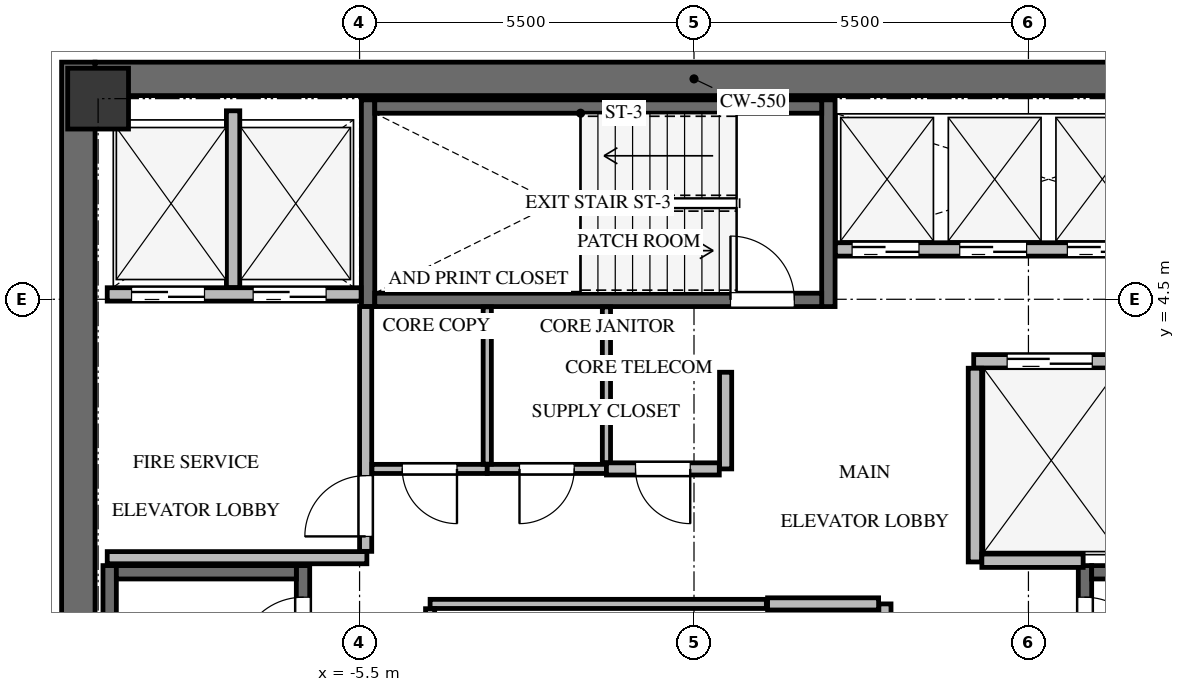
"""IFC4 building model, lengths in metres.
Left out: names, types, materials, properties, quantities, classifications, styles, units other than length and angle.
Written with IfcOpenShell. Run it as: python <this file> out.ifc"""

import sys

from ifc_helpers import new_model, si_unit, direction, frame, frame_2d, origin, origin_2d, place, context, subcontext, project, spatial, rectangle, extrude, source, transform, mapped, element, fill, save


model = new_model("IFC4")
c1 = context("Model", 3, precision=1e-05, world=origin(), true_north=direction((0.0, 1.0)))
c2 = subcontext(c1, "Body", "Model", "MODEL_VIEW")
j1 = project(units=[si_unit("LENGTHUNIT", "METRE"), si_unit("PLANEANGLEUNIT", "RADIAN")], contexts=[c1])
p1 = place(None, origin())
s1 = spatial("IfcSite", under=j1, at=p1, CompositionType="ELEMENT")
p2 = place(p1, origin())
s2 = spatial("IfcBuilding", under=s1, at=p2, CompositionType="ELEMENT")
p3 = place(p2, frame((0.0, 0.0, 258.1)))
s3 = spatial("IfcBuildingStorey", under=s2, at=p3, CompositionType="ELEMENT", Elevation=258.1)
p4 = place(p3, frame((-10.125, -8.4, 0.0), z_axis=(0.0, 0.0, 1.0), x_axis=(0.0, 1.0, 0.0)))
e1 = element("IfcWall", 1, at=p4, inside=s3, PredefinedType="SHEAR", context=c2, shape_type="SweptSolid", body=[
    extrude(rectangle(XDim=16.8, YDim=0.55, at=frame_2d((8.4, 0.0))), origin(), (0.0, 0.0, 1.0), 3.4),
])
p5 = place(p3, frame((-9.85, 8.125, 0.0), z_axis=(0.0, 0.0, 1.0), x_axis=(1.0, 0.0, 0.0)))
e2 = element("IfcWall", 2, at=p5, inside=s3, PredefinedType="SHEAR", context=c2, shape_type="SweptSolid", body=[
    extrude(rectangle(XDim=19.7, YDim=0.55, at=frame_2d((9.85, 0.0))), origin(), (0.0, 0.0, 1.0), 3.4),
])
p6 = place(p3, frame((-6.43, -7.77, -0.24), z_axis=(0.0, 0.0, 1.0), x_axis=(0.0, 1.0, 0.0)))
e3 = element("IfcWall", 3, at=p6, inside=s3, PredefinedType="SHEAR", context=c2, shape_type="SweptSolid", body=[
    extrude(rectangle(XDim=7.89, YDim=0.22, at=frame_2d((3.945, 0.0))), origin(), (0.0, 0.0, 1.0), 3.4),
])
p7 = place(p6, frame((6.32, 0.0, 0.0)))
e4 = element("IfcOpeningElement", 4, at=p7, cuts=e3, PredefinedType="OPENING", context=c2, shape_type="SweptSolid", body=[
    extrude(rectangle(XDim=1.05, YDim=2.15, at=frame_2d((0.525, 1.075))), frame((0.0, 0.12, 0.0), z_axis=(0.0, -1.0, 0.0), x_axis=(1.0, 0.0, 0.0)), (0.0, 0.0, 1.0), 0.24),
])
p8 = place(p3, frame((-9.61, 0.12, -0.24), z_axis=(0.0, 0.0, 1.0), x_axis=(0.0, -1.0, 0.0)))
e5 = element("IfcWall", 5, at=p8, inside=s3, PredefinedType="SHEAR", context=c2, shape_type="SweptSolid", body=[
    extrude(rectangle(XDim=7.89, YDim=0.22, at=frame_2d((3.945, 0.0))), origin(), (0.0, 0.0, 1.0), 3.4),
])
p9 = place(p3, frame((-6.54, 0.01, -0.24), z_axis=(0.0, 0.0, 1.0), x_axis=(-1.0, 0.0, 0.0)))
e6 = element("IfcWall", 6, at=p9, inside=s3, PredefinedType="SHEAR", context=c2, shape_type="SweptSolid", body=[
    extrude(rectangle(XDim=2.96, YDim=0.22, at=frame_2d((1.48, 0.0))), origin(), (0.0, 0.0, 1.0), 3.4),
])
p10 = place(p3, frame((6.43, 0.12, -0.24), z_axis=(0.0, 0.0, 1.0), x_axis=(0.0, -1.0, 0.0)))
e7 = element("IfcWall", 7, at=p10, inside=s3, PredefinedType="SHEAR", context=c2, shape_type="SweptSolid", body=[
    extrude(rectangle(XDim=7.89, YDim=0.22, at=frame_2d((3.945, 0.0))), origin(), (0.0, 0.0, 1.0), 3.4),
])
p11 = place(p10, frame((0.52, 0.0, 0.0)))
e8 = element("IfcOpeningElement", 8, at=p11, cuts=e7, PredefinedType="OPENING", context=c2, shape_type="SweptSolid", body=[
    extrude(rectangle(XDim=1.05, YDim=2.15, at=frame_2d((0.525, 1.075))), frame((0.0, 0.12, 0.0), z_axis=(0.0, -1.0, 0.0), x_axis=(1.0, 0.0, 0.0)), (0.0, 0.0, 1.0), 0.24),
])
p12 = place(p3, frame((9.5, 0.01, -0.24), z_axis=(0.0, 0.0, 1.0), x_axis=(-1.0, 0.0, 0.0)))
e9 = element("IfcWall", 9, at=p12, inside=s3, PredefinedType="SHEAR", context=c2, shape_type="SweptSolid", body=[
    extrude(rectangle(XDim=2.96, YDim=0.22, at=frame_2d((1.48, 0.0))), origin(), (0.0, 0.0, 1.0), 3.4),
])
for number, where, z_axis, x_axis in (
    (10, (2.21, 4.38, -0.24), (0.0, 0.0, 1.0), (0.0, 1.0, 0.0)),
    (11, (-5.36, 7.78, -0.24), (0.0, 0.0, 1.0), (0.0, -1.0, 0.0)),
):
    element("IfcWall", number, at=place(p3, frame(where, z_axis=z_axis, x_axis=x_axis)), inside=s3, PredefinedType="SHEAR", context=c2, shape_type="SweptSolid", body=[
        extrude(rectangle(XDim=3.4, YDim=0.22, at=frame_2d((1.7, 0.0))), origin(), (0.0, 0.0, 1.0), 3.4),
    ])
p13 = place(p3, frame((-5.25, 4.49, -0.24), z_axis=(0.0, 0.0, 1.0), x_axis=(1.0, 0.0, 0.0)))
e12 = element("IfcWall", 12, at=p13, inside=s3, PredefinedType="SHEAR", context=c2, shape_type="SweptSolid", body=[
    extrude(rectangle(XDim=7.35, YDim=0.22, at=frame_2d((3.675, 0.0))), origin(), (0.0, 0.0, 1.0), 3.4),
])
p14 = place(p13, frame((5.85, 0.0, 0.0)))
e13 = element("IfcOpeningElement", 13, at=p14, cuts=e12, PredefinedType="OPENING", context=c2, shape_type="SweptSolid", body=[
    extrude(rectangle(XDim=1.05, YDim=2.15, at=frame_2d((0.525, 1.075))), frame((0.0, 0.12, 0.0), z_axis=(0.0, -1.0, 0.0), x_axis=(1.0, 0.0, 0.0)), (0.0, 0.0, 1.0), 0.24),
])
p15 = place(p3, frame((2.1, 7.67, -0.24), z_axis=(0.0, 0.0, 1.0), x_axis=(-1.0, 0.0, 0.0)))
e14 = element("IfcWall", 14, at=p15, inside=s3, PredefinedType="SHEAR", context=c2, shape_type="SweptSolid", body=[
    extrude(rectangle(XDim=7.35, YDim=0.22, at=frame_2d((3.675, 0.0))), origin(), (0.0, 0.0, 1.0), 3.4),
])
m1 = source(origin(), c2, "Body", "SweptSolid", [
    extrude(rectangle(XDim=1.0, YDim=1.0, at=origin_2d()), origin(), (0.0, 0.0, 1.0), 3.4),
])
p16 = place(p3, frame((-9.8, 7.8, -0.24), z_axis=(0.0, 0.0, 1.0), x_axis=(1.0, 0.0, 0.0)))
e15 = element("IfcColumn", 15, at=p16, inside=s3, PredefinedType="COLUMN", context=c2, shape_type="MappedRepresentation", body=[
    mapped(m1, transform((0.0, 0.0, 0.0), x_axis=(1.0, 0.0, 0.0), y_axis=(0.0, 1.0, 0.0), z_axis=(0.0, 0.0, 1.0), scale=1.0)),
])
p17 = place(p3, frame((-9.65, 4.58, 0.0), z_axis=(0.0, 0.0, 1.0), x_axis=(1.0, 0.0, 0.0)))
e16 = element("IfcWall", 16, at=p17, inside=s3, PredefinedType="SOLIDWALL", context=c2, shape_type="SweptSolid", body=[
    extrude(rectangle(XDim=4.175, YDim=0.22, at=frame_2d((2.087, 0.0))), origin(), (0.0, 0.0, 1.0), 3.145),
])
p18 = place(p17, frame((0.4, 0.0, 0.0)))
e17 = element("IfcOpeningElement", 17, at=p18, cuts=e16, PredefinedType="OPENING", context=c2, shape_type="SweptSolid", body=[
    extrude(rectangle(XDim=1.2, YDim=2.15, at=frame_2d((0.6, 1.075))), frame((0.0, 0.12, 0.0), z_axis=(0.0, -1.0, 0.0), x_axis=(1.0, 0.0, 0.0)), (0.0, 0.0, 1.0), 0.24),
])
p19 = place(p17, frame((2.4, 0.0, 0.0)))
e18 = element("IfcOpeningElement", 18, at=p19, cuts=e16, PredefinedType="OPENING", context=c2, shape_type="SweptSolid", body=[
    extrude(rectangle(XDim=1.2, YDim=2.15, at=frame_2d((0.6, 1.075))), frame((0.0, 0.12, 0.0), z_axis=(0.0, -1.0, 0.0), x_axis=(1.0, 0.0, 0.0)), (0.0, 0.0, 1.0), 0.24),
])
p20 = place(p3, frame((-7.58, 4.694, 0.0), z_axis=(0.0, 0.0, 1.0), x_axis=(0.0, 1.0, 0.0)))
e19 = element("IfcWall", 19, at=p20, inside=s3, PredefinedType="SOLIDWALL", context=c2, shape_type="SweptSolid", body=[
    extrude(rectangle(XDim=2.906, YDim=0.22, at=frame_2d((1.453, 0.0))), origin(), (0.0, 0.0, 1.0), 3.145),
])
p21 = place(p3, frame((-9.65, 0.25, 0.0), z_axis=(0.0, 0.0, 1.0), x_axis=(1.0, 0.0, 0.0)))
e20 = element("IfcWall", 20, at=p21, inside=s3, PredefinedType="SOLIDWALL", context=c2, shape_type="SweptSolid", body=[
    extrude(rectangle(XDim=4.27, YDim=0.2, at=frame_2d((2.135, 0.0))), origin(), (0.0, 0.0, 1.0), 3.145),
])
p22 = place(p3, frame((-5.4, 0.354, 0.0), z_axis=(0.0, 0.0, 1.0), x_axis=(0.0, 1.0, 0.0)))
e21 = element("IfcWall", 21, at=p22, inside=s3, PredefinedType="SOLIDWALL", context=c2, shape_type="SweptSolid", body=[
    extrude(rectangle(XDim=4.026, YDim=0.2, at=frame_2d((2.013, 0.0))), origin(), (0.0, 0.0, 1.0), 3.145),
])
p23 = place(p22, frame((0.246, 0.0, 0.0)))
e22 = element("IfcOpeningElement", 22, at=p23, cuts=e21, PredefinedType="OPENING", context=c2, shape_type="SweptSolid", body=[
    extrude(rectangle(XDim=1.0, YDim=2.15, at=frame_2d((0.5, 1.075))), frame((0.0, 0.11, 0.0), z_axis=(0.0, -1.0, 0.0), x_axis=(1.0, 0.0, 0.0)), (0.0, 0.0, 1.0), 0.22),
])
p24 = place(p3, frame((4.6, 3.48, 0.0), z_axis=(0.0, 0.0, 1.0), x_axis=(1.0, 0.0, 0.0)))
e23 = element("IfcWall", 23, at=p24, inside=s3, PredefinedType="SOLIDWALL", context=c2, shape_type="SweptSolid", body=[
    extrude(rectangle(XDim=5.05, YDim=0.22, at=frame_2d((2.525, 0.0))), origin(), (0.0, 0.0, 1.0), 3.145),
])
p25 = place(p24, frame((0.55, 0.0, 0.0)))
e24 = element("IfcOpeningElement", 24, at=p25, cuts=e23, PredefinedType="OPENING", context=c2, shape_type="SweptSolid", body=[
    extrude(rectangle(XDim=1.4, YDim=2.15, at=frame_2d((0.7, 1.075))), frame((0.0, 0.12, 0.0), z_axis=(0.0, -1.0, 0.0), x_axis=(1.0, 0.0, 0.0)), (0.0, 0.0, 1.0), 0.24),
])
p26 = place(p24, frame((3.05, 0.0, 0.0)))
e25 = element("IfcOpeningElement", 25, at=p26, cuts=e23, PredefinedType="OPENING", context=c2, shape_type="SweptSolid", body=[
    extrude(rectangle(XDim=1.4, YDim=2.15, at=frame_2d((0.7, 1.075))), frame((0.0, 0.12, 0.0), z_axis=(0.0, -1.0, 0.0), x_axis=(1.0, 0.0, 0.0)), (0.0, 0.0, 1.0), 0.24),
])
p27 = place(p3, frame((4.62, 0.18, 0.0), z_axis=(0.0, 0.0, 1.0), x_axis=(0.0, 1.0, 0.0)))
e26 = element("IfcWall", 26, at=p27, inside=s3, PredefinedType="SOLIDWALL", context=c2, shape_type="SweptSolid", body=[
    extrude(rectangle(XDim=3.186, YDim=0.22, at=frame_2d((1.593, 0.0))), origin(), (0.0, 0.0, 1.0), 3.145),
])
p28 = place(p3, frame((4.734, 0.2, 0.0), z_axis=(0.0, 0.0, 1.0), x_axis=(1.0, 0.0, 0.0)))
e27 = element("IfcWall", 27, at=p28, inside=s3, PredefinedType="SOLIDWALL", context=c2, shape_type="SweptSolid", body=[
    extrude(rectangle(XDim=1.666, YDim=0.22, at=frame_2d((0.833, 0.0))), origin(), (0.0, 0.0, 1.0), 3.145),
])
p29 = place(p3, frame((2.325, 5.32, 0.0), z_axis=(0.0, 0.0, 1.0), x_axis=(1.0, 0.0, 0.0)))
e28 = element("IfcWall", 28, at=p29, inside=s3, PredefinedType="SOLIDWALL", context=c2, shape_type="SweptSolid", body=[
    extrude(rectangle(XDim=7.325, YDim=0.22, at=frame_2d((3.663, 0.0))), origin(), (0.0, 0.0, 1.0), 3.145),
])
p30 = place(p29, frame((0.275, 0.0, 0.0)))
e29 = element("IfcOpeningElement", 29, at=p30, cuts=e28, PredefinedType="OPENING", context=c2, shape_type="SweptSolid", body=[
    extrude(rectangle(XDim=1.1, YDim=2.15, at=frame_2d((0.55, 1.075))), frame((0.0, 0.12, 0.0), z_axis=(0.0, -1.0, 0.0), x_axis=(1.0, 0.0, 0.0)), (0.0, 0.0, 1.0), 0.24),
])
p31 = place(p29, frame((2.045, 0.0, 0.0)))
e30 = element("IfcOpeningElement", 30, at=p31, cuts=e28, PredefinedType="OPENING", context=c2, shape_type="SweptSolid", body=[
    extrude(rectangle(XDim=1.1, YDim=2.15, at=frame_2d((0.55, 1.075))), frame((0.0, 0.12, 0.0), z_axis=(0.0, -1.0, 0.0), x_axis=(1.0, 0.0, 0.0)), (0.0, 0.0, 1.0), 0.24),
])
p32 = place(p29, frame((3.815, 0.0, 0.0)))
e31 = element("IfcOpeningElement", 31, at=p32, cuts=e28, PredefinedType="OPENING", context=c2, shape_type="SweptSolid", body=[
    extrude(rectangle(XDim=1.1, YDim=2.15, at=frame_2d((0.55, 1.075))), frame((0.0, 0.12, 0.0), z_axis=(0.0, -1.0, 0.0), x_axis=(1.0, 0.0, 0.0)), (0.0, 0.0, 1.0), 0.24),
])
p33 = place(p29, frame((5.585, 0.0, 0.0)))
e32 = element("IfcOpeningElement", 32, at=p33, cuts=e28, PredefinedType="OPENING", context=c2, shape_type="SweptSolid", body=[
    extrude(rectangle(XDim=1.1, YDim=2.15, at=frame_2d((0.55, 1.075))), frame((0.0, 0.12, 0.0), z_axis=(0.0, -1.0, 0.0), x_axis=(1.0, 0.0, 0.0)), (0.0, 0.0, 1.0), 0.24),
])
p34 = place(p3, frame((-4.34, -0.51, 0.0), z_axis=(0.0, 0.0, 1.0), x_axis=(1.0, 0.0, 0.0)))
e33 = element("IfcWall", 33, at=p34, inside=s3, PredefinedType="PARTITIONING", context=c2, shape_type="SweptSolid", body=[
    extrude(rectangle(XDim=5.53, YDim=0.15, at=frame_2d((2.765, 0.0))), origin(), (0.0, 0.0, 1.0), 3.145),
])
p35 = place(p3, frame((-4.34, -2.961, 0.0), z_axis=(0.0, 0.0, 1.0), x_axis=(0.0, 1.0, 0.0)))
e34 = element("IfcWall", 34, at=p35, inside=s3, PredefinedType="PARTITIONING", context=c2, shape_type="SweptSolid", body=[
    extrude(rectangle(XDim=2.372, YDim=0.15, at=frame_2d((1.186, 0.0))), origin(), (0.0, 0.0, 1.0), 3.145),
])
p36 = place(p3, frame((3.14, -0.51, 0.0), z_axis=(0.0, 0.0, 1.0), x_axis=(0.0, -1.0, 0.0)))
e35 = element("IfcWall", 35, at=p36, inside=s3, PredefinedType="SOLIDWALL", context=c2, shape_type="SweptSolid", body=[
    extrude(rectangle(XDim=2.53, YDim=0.2, at=frame_2d((1.265, 0.0))), origin(), (0.0, 0.0, 1.0), 3.145),
])
p37 = place(p36, frame((0.815, 0.0, 0.0)))
e36 = element("IfcOpeningElement", 36, at=p37, cuts=e35, PredefinedType="OPENING", context=c2, shape_type="SweptSolid", body=[
    extrude(rectangle(XDim=0.9, YDim=2.05, at=frame_2d((0.45, 1.025))), frame((0.0, 0.11, 0.0), z_axis=(0.0, -1.0, 0.0), x_axis=(1.0, 0.0, 0.0)), (0.0, 0.0, 1.0), 0.22),
])
p38 = place(p3, frame((1.21, -0.51, 0.0), z_axis=(0.0, 0.0, 1.0), x_axis=(1.0, 0.0, 0.0)))
e37 = element("IfcWall", 37, at=p38, inside=s3, PredefinedType="SOLIDWALL", context=c2, shape_type="SweptSolid", body=[
    extrude(rectangle(XDim=1.826, YDim=0.2, at=frame_2d((0.913, 0.0))), origin(), (0.0, 0.0, 1.0), 3.145),
])
p39 = place(p3, frame((-3.4, 1.71, 0.0), z_axis=(0.0, 0.0, 1.0), x_axis=(-1.0, 0.0, 0.0)))
e38 = element("IfcWall", 38, at=p39, inside=s3, PredefinedType="PARTITIONING", context=c2, shape_type="SweptSolid", body=[
    extrude(rectangle(XDim=1.896, YDim=0.15, at=frame_2d((0.948, 0.0))), origin(), (0.0, 0.0, 1.0), 3.145),
])
p40 = place(p39, frame((0.498, 0.0, 0.0)))
e39 = element("IfcOpeningElement", 39, at=p40, cuts=e38, PredefinedType="OPENING", context=c2, shape_type="SweptSolid", body=[
    extrude(rectangle(XDim=0.9, YDim=2.05, at=frame_2d((0.45, 1.025))), frame((0.0, 0.085, 0.0), z_axis=(0.0, -1.0, 0.0), x_axis=(1.0, 0.0, 0.0)), (0.0, 0.0, 1.0), 0.17),
])
p41 = place(p3, frame((-1.44, 1.71, 0.0), z_axis=(0.0, 0.0, 1.0), x_axis=(-1.0, 0.0, 0.0)))
e40 = element("IfcWall", 40, at=p41, inside=s3, PredefinedType="PARTITIONING", context=c2, shape_type="SweptSolid", body=[
    extrude(rectangle(XDim=1.96, YDim=0.15, at=frame_2d((0.98, 0.0))), origin(), (0.0, 0.0, 1.0), 3.145),
])
p42 = place(p41, frame((0.53, 0.0, 0.0)))
e41 = element("IfcOpeningElement", 41, at=p42, cuts=e40, PredefinedType="OPENING", context=c2, shape_type="SweptSolid", body=[
    extrude(rectangle(XDim=0.9, YDim=2.05, at=frame_2d((0.45, 1.025))), frame((0.0, 0.085, 0.0), z_axis=(0.0, -1.0, 0.0), x_axis=(1.0, 0.0, 0.0)), (0.0, 0.0, 1.0), 0.17),
])
p43 = place(p3, frame((0.52, 3.3, 0.0), z_axis=(0.0, 0.0, 1.0), x_axis=(0.0, -1.0, 0.0)))
e42 = element("IfcWall", 42, at=p43, inside=s3, PredefinedType="SOLIDWALL", context=c2, shape_type="SweptSolid", body=[
    extrude(rectangle(XDim=1.59, YDim=0.2, at=frame_2d((0.795, 0.0))), origin(), (0.0, 0.0, 1.0), 3.145),
])
p44 = place(p3, frame((0.416, 1.71, 0.0), z_axis=(0.0, 0.0, 1.0), x_axis=(-1.0, 0.0, 0.0)))
e43 = element("IfcWall", 43, at=p44, inside=s3, PredefinedType="SOLIDWALL", context=c2, shape_type="SweptSolid", body=[
    extrude(rectangle(XDim=1.856, YDim=0.2, at=frame_2d((0.928, 0.0))), origin(), (0.0, 0.0, 1.0), 3.145),
])
p45 = place(p44, frame((0.478, 0.0, 0.0)))
e44 = element("IfcOpeningElement", 44, at=p45, cuts=e43, PredefinedType="OPENING", context=c2, shape_type="SweptSolid", body=[
    extrude(rectangle(XDim=0.9, YDim=2.05, at=frame_2d((0.45, 1.025))), frame((0.0, 0.11, 0.0), z_axis=(0.0, -1.0, 0.0), x_axis=(1.0, 0.0, 0.0)), (0.0, 0.0, 1.0), 0.22),
])
p46 = place(p3, frame((-3.4, 4.375, 0.0), z_axis=(0.0, 0.0, 1.0), x_axis=(0.0, -1.0, 0.0)))
e45 = element("IfcWall", 45, at=p46, inside=s3, PredefinedType="PARTITIONING", context=c2, shape_type="SweptSolid", body=[
    extrude(rectangle(XDim=2.586, YDim=0.135, at=frame_2d((1.293, 0.0))), origin(), (0.0, 0.0, 1.0), 3.145),
])
p47 = place(p3, frame((-1.44, 4.375, 0.0), z_axis=(0.0, 0.0, 1.0), x_axis=(0.0, -1.0, 0.0)))
e46 = element("IfcWall", 46, at=p47, inside=s3, PredefinedType="PARTITIONING", context=c2, shape_type="SweptSolid", body=[
    extrude(rectangle(XDim=2.561, YDim=0.135, at=frame_2d((1.281, 0.0))), origin(), (0.0, 0.0, 1.0), 3.145),
])
m2 = source(origin(), c2, "Body", "SweptSolid", [
    extrude(rectangle(XDim=1.05, YDim=2.15, at=frame_2d((0.525, 1.075))), frame((0.0, 0.025, 0.0), z_axis=(0.0, -1.0, 0.0), x_axis=(1.0, 0.0, 0.0)), (0.0, 0.0, 1.0), 0.05),
])
p48 = place(p7, origin())
e47 = element("IfcDoor", 47, at=p48, inside=s3, OperationType="SINGLE_SWING_LEFT", PredefinedType="DOOR", context=c2, shape_type="MappedRepresentation", body=[
    mapped(m2, transform((0.0, 0.0, 0.0), x_axis=(1.0, 0.0, 0.0), y_axis=(0.0, 1.0, 0.0), z_axis=(0.0, 0.0, 1.0), scale=1.0)),
])
fill(e4, e47)
m3 = source(origin(), c2, "Body", "SweptSolid", [
    extrude(rectangle(XDim=1.05, YDim=2.15, at=frame_2d((0.525, 1.075))), frame((0.0, 0.025, 0.0), z_axis=(0.0, -1.0, 0.0), x_axis=(1.0, 0.0, 0.0)), (0.0, 0.0, 1.0), 0.05),
])
p49 = place(p11, origin())
e48 = element("IfcDoor", 48, at=p49, inside=s3, OperationType="SINGLE_SWING_RIGHT", PredefinedType="DOOR", context=c2, shape_type="MappedRepresentation", body=[
    mapped(m3, transform((0.0, 0.0, 0.0), x_axis=(1.0, 0.0, 0.0), y_axis=(0.0, 1.0, 0.0), z_axis=(0.0, 0.0, 1.0), scale=1.0)),
])
fill(e8, e48)
p50 = place(p14, origin())
e49 = element("IfcDoor", 49, at=p50, inside=s3, OperationType="SINGLE_SWING_LEFT", PredefinedType="DOOR", context=c2, shape_type="MappedRepresentation", body=[
    mapped(m2, transform((0.0, 0.0, 0.0), x_axis=(1.0, 0.0, 0.0), y_axis=(0.0, 1.0, 0.0), z_axis=(0.0, 0.0, 1.0), scale=1.0)),
])
fill(e13, e49)
m4 = source(origin(), c2, "Body", "SweptSolid", [
    extrude(rectangle(XDim=1.2, YDim=2.15, at=frame_2d((0.6, 1.075))), frame((0.0, 0.025, 0.0), z_axis=(0.0, -1.0, 0.0), x_axis=(1.0, 0.0, 0.0)), (0.0, 0.0, 1.0), 0.05),
])
p51 = place(p18, origin())
e50 = element("IfcDoor", 50, at=p51, inside=s3, OperationType="DOUBLE_DOOR_SLIDING", PredefinedType="DOOR", context=c2, shape_type="MappedRepresentation", body=[
    mapped(m4, transform((0.0, 0.0, 0.0), x_axis=(1.0, 0.0, 0.0), y_axis=(0.0, 1.0, 0.0), z_axis=(0.0, 0.0, 1.0), scale=1.0)),
])
fill(e17, e50)
p52 = place(p19, origin())
e51 = element("IfcDoor", 51, at=p52, inside=s3, OperationType="DOUBLE_DOOR_SLIDING", PredefinedType="DOOR", context=c2, shape_type="MappedRepresentation", body=[
    mapped(m4, transform((0.0, 0.0, 0.0), x_axis=(1.0, 0.0, 0.0), y_axis=(0.0, 1.0, 0.0), z_axis=(0.0, 0.0, 1.0), scale=1.0)),
])
fill(e18, e51)
m5 = source(origin(), c2, "Body", "SweptSolid", [
    extrude(rectangle(XDim=1.0, YDim=2.15, at=frame_2d((0.5, 1.075))), frame((0.0, 0.025, 0.0), z_axis=(0.0, -1.0, 0.0), x_axis=(1.0, 0.0, 0.0)), (0.0, 0.0, 1.0), 0.05),
])
p53 = place(p23, origin())
e52 = element("IfcDoor", 52, at=p53, inside=s3, OperationType="SINGLE_SWING_LEFT", PredefinedType="DOOR", context=c2, shape_type="MappedRepresentation", body=[
    mapped(m5, transform((0.0, 0.0, 0.0), x_axis=(1.0, 0.0, 0.0), y_axis=(0.0, 1.0, 0.0), z_axis=(0.0, 0.0, 1.0), scale=1.0)),
])
fill(e22, e52)
m6 = source(origin(), c2, "Body", "SweptSolid", [
    extrude(rectangle(XDim=1.4, YDim=2.15, at=frame_2d((0.7, 1.075))), frame((0.0, 0.025, 0.0), z_axis=(0.0, -1.0, 0.0), x_axis=(1.0, 0.0, 0.0)), (0.0, 0.0, 1.0), 0.05),
])
p54 = place(p25, origin())
e53 = element("IfcDoor", 53, at=p54, inside=s3, OperationType="DOUBLE_DOOR_SLIDING", PredefinedType="DOOR", context=c2, shape_type="MappedRepresentation", body=[
    mapped(m6, transform((0.0, 0.0, 0.0), x_axis=(1.0, 0.0, 0.0), y_axis=(0.0, 1.0, 0.0), z_axis=(0.0, 0.0, 1.0), scale=1.0)),
])
fill(e24, e53)
m7 = source(origin(), c2, "Body", "SweptSolid", [
    extrude(rectangle(XDim=1.1, YDim=2.15, at=frame_2d((0.55, 1.075))), frame((0.0, 0.025, 0.0), z_axis=(0.0, -1.0, 0.0), x_axis=(1.0, 0.0, 0.0)), (0.0, 0.0, 1.0), 0.05),
])
p55 = place(p30, origin())
e54 = element("IfcDoor", 54, at=p55, inside=s3, OperationType="DOUBLE_DOOR_SLIDING", PredefinedType="DOOR", context=c2, shape_type="MappedRepresentation", body=[
    mapped(m7, transform((0.0, 0.0, 0.0), x_axis=(1.0, 0.0, 0.0), y_axis=(0.0, 1.0, 0.0), z_axis=(0.0, 0.0, 1.0), scale=1.0)),
])
fill(e29, e54)
p56 = place(p31, origin())
e55 = element("IfcDoor", 55, at=p56, inside=s3, OperationType="DOUBLE_DOOR_SLIDING", PredefinedType="DOOR", context=c2, shape_type="MappedRepresentation", body=[
    mapped(m7, transform((0.0, 0.0, 0.0), x_axis=(1.0, 0.0, 0.0), y_axis=(0.0, 1.0, 0.0), z_axis=(0.0, 0.0, 1.0), scale=1.0)),
])
fill(e30, e55)
p57 = place(p32, origin())
e56 = element("IfcDoor", 56, at=p57, inside=s3, OperationType="DOUBLE_DOOR_SLIDING", PredefinedType="DOOR", context=c2, shape_type="MappedRepresentation", body=[
    mapped(m7, transform((0.0, 0.0, 0.0), x_axis=(1.0, 0.0, 0.0), y_axis=(0.0, 1.0, 0.0), z_axis=(0.0, 0.0, 1.0), scale=1.0)),
])
fill(e31, e56)
m8 = source(origin(), c2, "Body", "SweptSolid", [
    extrude(rectangle(XDim=0.9, YDim=2.05, at=frame_2d((0.45, 1.025))), frame((0.0, 0.025, 0.0), z_axis=(0.0, -1.0, 0.0), x_axis=(1.0, 0.0, 0.0)), (0.0, 0.0, 1.0), 0.05),
])
p58 = place(p40, origin())
e57 = element("IfcDoor", 57, at=p58, inside=s3, OperationType="SINGLE_SWING_LEFT", PredefinedType="DOOR", context=c2, shape_type="MappedRepresentation", body=[
    mapped(m8, transform((0.0, 0.0, 0.0), x_axis=(1.0, 0.0, 0.0), y_axis=(0.0, 1.0, 0.0), z_axis=(0.0, 0.0, 1.0), scale=1.0)),
])
fill(e39, e57)
m9 = source(origin(), c2, "Body", "SweptSolid", [
    extrude(rectangle(XDim=0.9, YDim=2.05, at=frame_2d((0.45, 1.025))), frame((0.0, 0.025, 0.0), z_axis=(0.0, -1.0, 0.0), x_axis=(1.0, 0.0, 0.0)), (0.0, 0.0, 1.0), 0.05),
])
p59 = place(p42, origin())
e58 = element("IfcDoor", 58, at=p59, inside=s3, OperationType="SINGLE_SWING_RIGHT", PredefinedType="DOOR", context=c2, shape_type="MappedRepresentation", body=[
    mapped(m9, transform((0.0, 0.0, 0.0), x_axis=(1.0, 0.0, 0.0), y_axis=(0.0, 1.0, 0.0), z_axis=(0.0, 0.0, 1.0), scale=1.0)),
])
fill(e41, e58)
p60 = place(p45, origin())
e59 = element("IfcDoor", 59, at=p60, inside=s3, OperationType="SINGLE_SWING_LEFT", PredefinedType="DOOR", context=c2, shape_type="MappedRepresentation", body=[
    mapped(m8, transform((0.0, 0.0, 0.0), x_axis=(1.0, 0.0, 0.0), y_axis=(0.0, 1.0, 0.0), z_axis=(0.0, 0.0, 1.0), scale=1.0)),
])
fill(e44, e59)
save(model, sys.argv[1])
